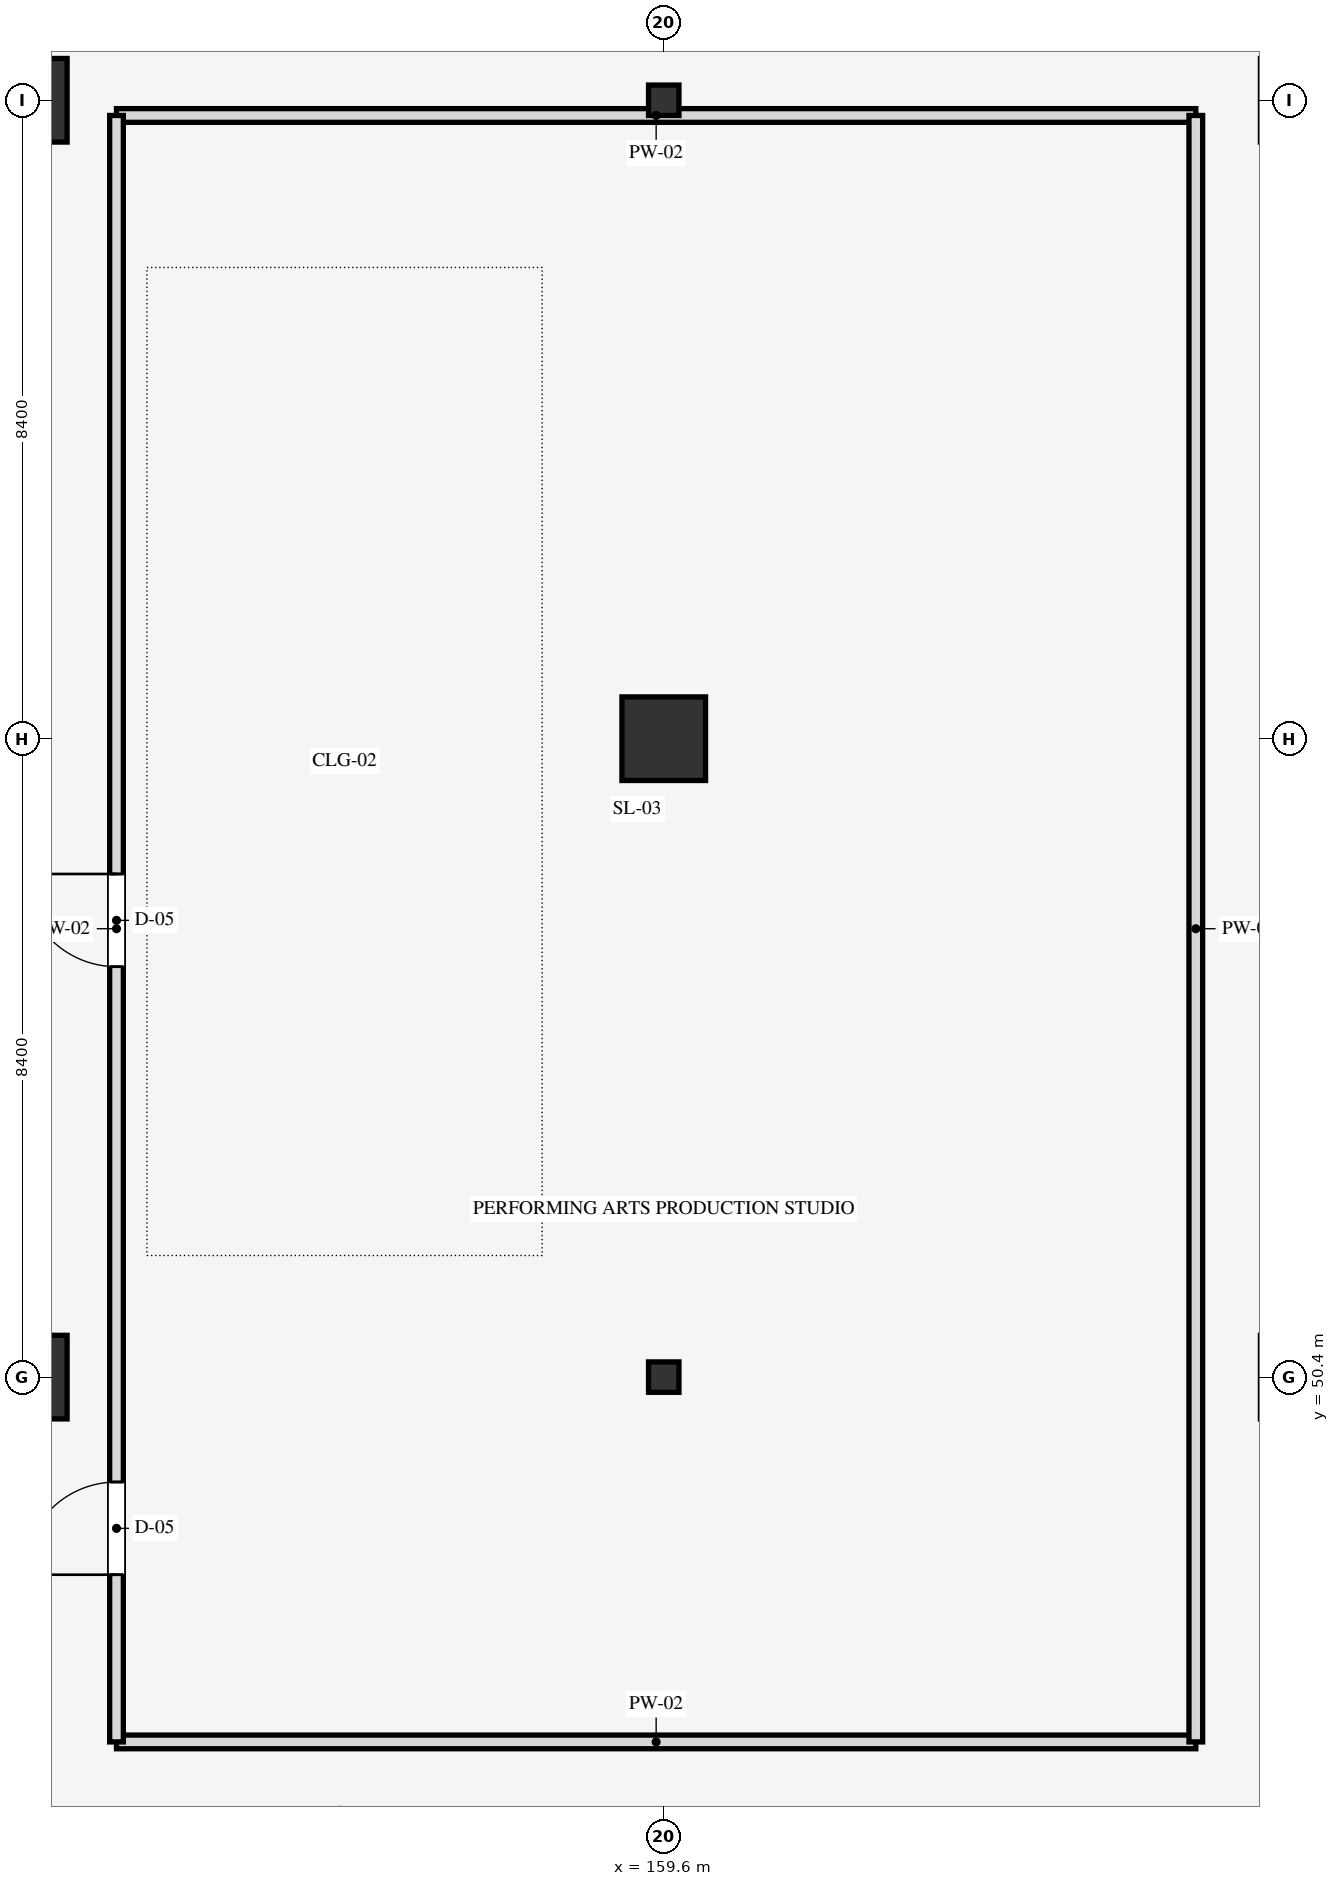
"""IFC4 building model, lengths in metres.
Left out: names, types, materials, properties, quantities, classifications, styles, units other than length and angle.
Written with IfcOpenShell. Run it as: python <this file> out.ifc"""

import sys

from ifc_helpers import new_model, si_unit, direction, frame, frame_2d, origin, origin_2d, place, context, subcontext, project, spatial, rectangle, i_section, extrude, element, fill, save


model = new_model("IFC4")
c1 = context("Model", 3, precision=1e-05, world=origin(), true_north=direction((0.0, 1.0)))
c2 = subcontext(c1, "Body", "Model", "MODEL_VIEW")
j1 = project(units=[si_unit("LENGTHUNIT", "METRE"), si_unit("PLANEANGLEUNIT", "RADIAN")], contexts=[c1])
p1 = place(None, origin())
s1 = spatial("IfcSite", under=j1, at=p1, CompositionType="ELEMENT")
p2 = place(p1, origin())
s2 = spatial("IfcBuilding", under=s1, at=p2, CompositionType="ELEMENT")
p3 = place(p2, frame((0.0, 0.0, 27.9)))
s3 = spatial("IfcBuildingStorey", under=s2, at=p3, CompositionType="ELEMENT", Elevation=27.9)
for number, where, z_axis, x_axis in (
    (1, (151.2, 50.4, 0.0), (0.0, 0.0, 1.0), (1.0, 0.0, 0.0)),
    (2, (151.2, 67.2, 0.0), (0.0, 0.0, 1.0), (1.0, 0.0, 0.0)),
):
    element("IfcColumn", number, at=place(p3, frame(where, z_axis=z_axis, x_axis=x_axis)), inside=s3, PredefinedType="COLUMN", context=c2, shape_type="SweptSolid", body=[
        extrude(rectangle(XDim=1.1, YDim=1.1, at=origin_2d()), origin(), (0.0, 0.0, 1.0), 4.2),
    ])
p4 = place(p3, frame((159.6, 50.4, 0.0), z_axis=(0.0, 0.0, 1.0), x_axis=(1.0, 0.0, 0.0)))
e3 = element("IfcColumn", 3, at=p4, inside=s3, PredefinedType="COLUMN", context=c2, shape_type="SweptSolid", body=[
    extrude(i_section(OverallWidth=0.4, OverallDepth=0.4, WebThickness=0.013, FlangeThickness=0.021, FilletRadius=0.022, at=origin_2d()), origin(), (0.0, 0.0, 1.0), 4.2),
])
p5 = place(p3, frame((159.6, 58.8, 0.0), z_axis=(0.0, 0.0, 1.0), x_axis=(1.0, 0.0, 0.0)))
e4 = element("IfcColumn", 4, at=p5, inside=s3, PredefinedType="COLUMN", context=c2, shape_type="SweptSolid", body=[
    extrude(rectangle(XDim=1.1, YDim=1.1, at=origin_2d()), origin(), (0.0, 0.0, 1.0), 4.2),
])
p6 = place(p3, frame((159.6, 67.2, 0.0), z_axis=(0.0, 0.0, 1.0), x_axis=(1.0, 0.0, 0.0)))
e5 = element("IfcColumn", 5, at=p6, inside=s3, PredefinedType="COLUMN", context=c2, shape_type="SweptSolid", body=[
    extrude(i_section(OverallWidth=0.4, OverallDepth=0.4, WebThickness=0.013, FlangeThickness=0.021, FilletRadius=0.022, at=origin_2d()), origin(), (0.0, 0.0, 1.0), 4.2),
])
for number, where, z_axis, x_axis in (
    (6, (152.4, 45.6, 0.0), (0.0, 0.0, 1.0), (1.0, 0.0, 0.0)),
    (7, (152.4, 67.0, 0.0), (0.0, 0.0, 1.0), (1.0, 0.0, 0.0)),
):
    element("IfcWall", number, at=place(p3, frame(where, z_axis=z_axis, x_axis=x_axis)), inside=s3, PredefinedType="PARTITIONING", context=c2, shape_type="SweptSolid", body=[
        extrude(rectangle(XDim=14.2, YDim=0.18, at=frame_2d((7.1, 0.0))), origin(), (0.0, 0.0, 1.0), 3.24),
    ])
p7 = place(p3, frame((152.4, 45.6, 0.0), z_axis=(0.0, 0.0, 1.0), x_axis=(0.0, 1.0, 0.0)))
e8 = element("IfcWall", 8, at=p7, inside=s3, PredefinedType="PARTITIONING", context=c2, shape_type="SweptSolid", body=[
    extrude(rectangle(XDim=21.4, YDim=0.18, at=frame_2d((10.7, 0.0))), origin(), (0.0, 0.0, 1.0), 3.24),
])
p8 = place(p7, frame((2.2, 0.0, 0.0)))
e9 = element("IfcOpeningElement", 9, at=p8, cuts=e8, PredefinedType="OPENING", context=c2, shape_type="SweptSolid", body=[
    extrude(rectangle(XDim=1.22, YDim=2.15, at=frame_2d((0.61, 1.075))), frame((0.0, 0.1, 0.0), z_axis=(0.0, -1.0, 0.0), x_axis=(1.0, 0.0, 0.0)), (0.0, 0.0, 1.0), 0.2),
])
p9 = place(p7, frame((10.2, 0.0, 0.0)))
e10 = element("IfcOpeningElement", 10, at=p9, cuts=e8, PredefinedType="OPENING", context=c2, shape_type="SweptSolid", body=[
    extrude(rectangle(XDim=1.22, YDim=2.15, at=frame_2d((0.61, 1.075))), frame((0.0, 0.1, 0.0), z_axis=(0.0, -1.0, 0.0), x_axis=(1.0, 0.0, 0.0)), (0.0, 0.0, 1.0), 0.2),
])
p10 = place(p3, frame((166.6, 45.6, 0.0), z_axis=(0.0, 0.0, 1.0), x_axis=(0.0, 1.0, 0.0)))
e11 = element("IfcWall", 11, at=p10, inside=s3, PredefinedType="PARTITIONING", context=c2, shape_type="SweptSolid", body=[
    extrude(rectangle(XDim=21.4, YDim=0.18, at=frame_2d((10.7, 0.0))), origin(), (0.0, 0.0, 1.0), 3.24),
])
p11 = place(p8, origin())
e12 = element("IfcDoor", 12, at=p11, inside=s3, OperationType="SINGLE_SWING_LEFT", PredefinedType="DOOR", context=c2, shape_type="SweptSolid", body=[
    extrude(rectangle(XDim=1.22, YDim=2.15, at=frame_2d((0.61, 1.075))), frame((0.0, 0.025, 0.0), z_axis=(0.0, -1.0, 0.0), x_axis=(1.0, 0.0, 0.0)), (0.0, 0.0, 1.0), 0.05),
])
fill(e9, e12)
p12 = place(p9, origin())
e13 = element("IfcDoor", 13, at=p12, inside=s3, OperationType="SINGLE_SWING_RIGHT", PredefinedType="DOOR", context=c2, shape_type="SweptSolid", body=[
    extrude(rectangle(XDim=1.22, YDim=2.15, at=frame_2d((0.61, 1.075))), frame((0.0, 0.025, 0.0), z_axis=(0.0, -1.0, 0.0), x_axis=(1.0, 0.0, 0.0)), (0.0, 0.0, 1.0), 0.05),
])
fill(e10, e13)
save(model, sys.argv[1])
